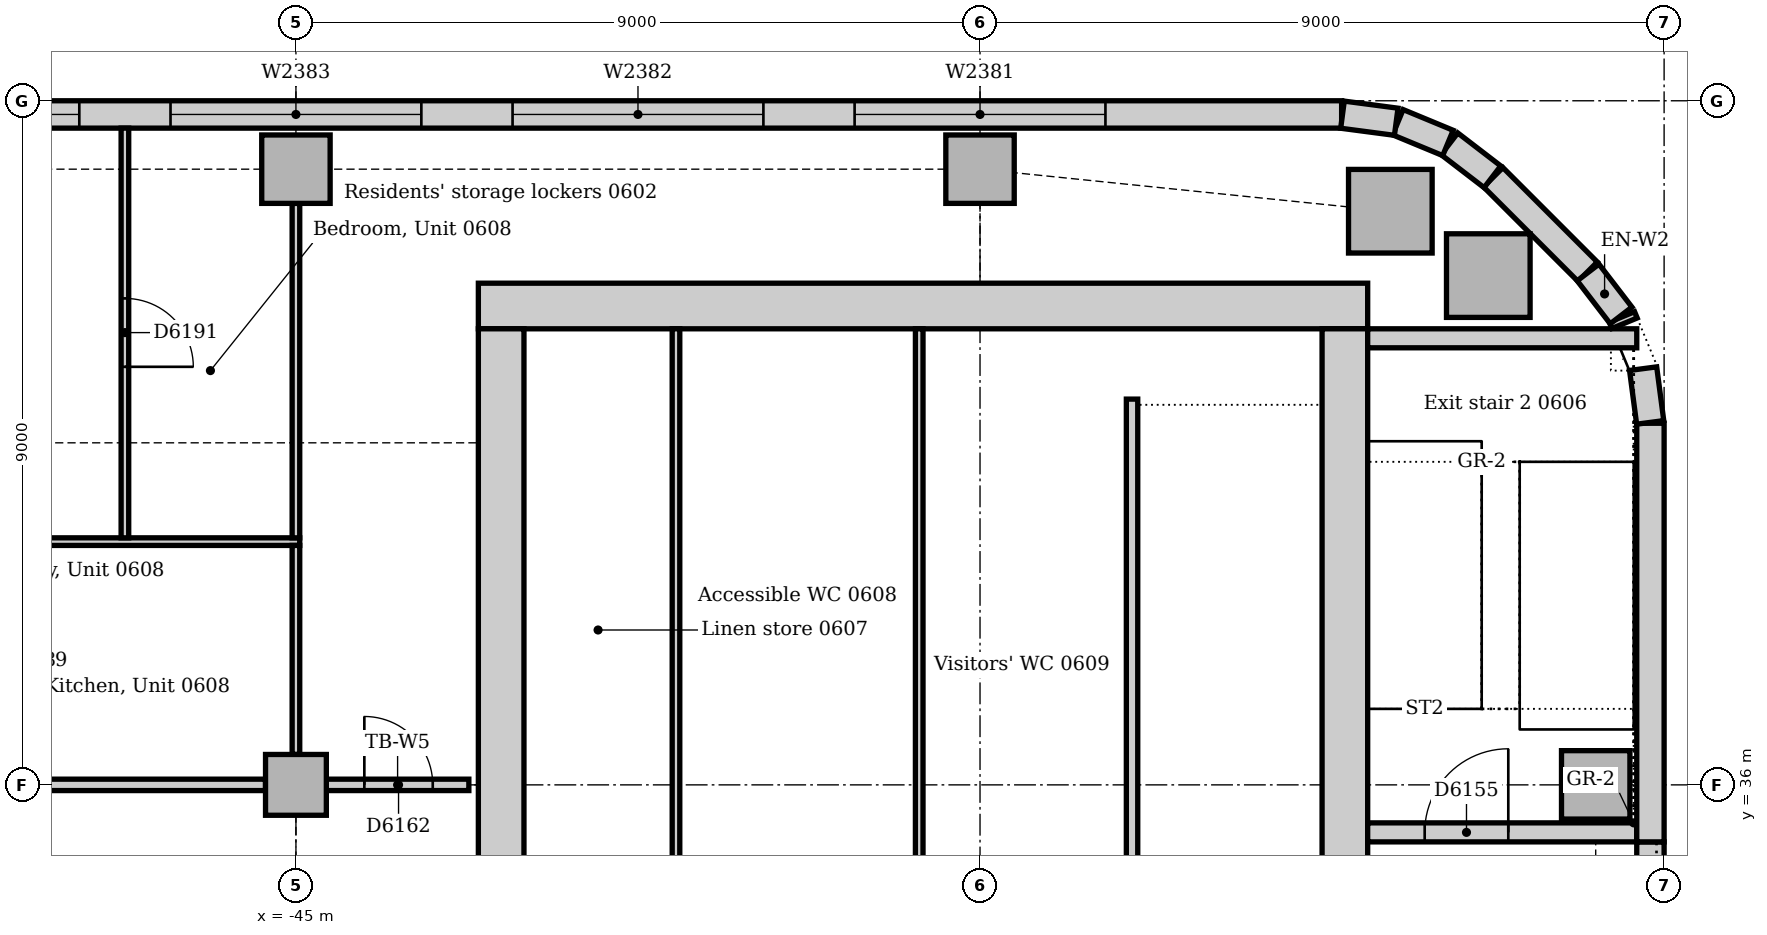
"""IFC4 building model, lengths in metres.
Left out: names, types, materials, properties, quantities, classifications, styles, units other than length and angle.
Written with IfcOpenShell. Run it as: python <this file> out.ifc"""

import sys

from ifc_helpers import new_model, si_unit, direction, frame, frame_2d, origin, origin_2d, place, context, subcontext, project, spatial, rectangle, extrude, element, fill, save


model = new_model("IFC4")
c1 = context("Model", 3, precision=1e-05, world=origin(), true_north=direction((0.0, 1.0)))
c2 = subcontext(c1, "Body", "Model", "MODEL_VIEW")
j1 = project(units=[si_unit("LENGTHUNIT", "METRE"), si_unit("PLANEANGLEUNIT", "RADIAN")], contexts=[c1])
p1 = place(None, origin())
s1 = spatial("IfcSite", under=j1, at=p1, CompositionType="ELEMENT")
p2 = place(p1, origin())
s2 = spatial("IfcBuilding", under=s1, at=p2, CompositionType="ELEMENT")
p3 = place(p2, frame((0.0, 0.0, 30.0)))
s3 = spatial("IfcBuildingStorey", under=s2, at=p3, CompositionType="ELEMENT", Elevation=30.0)
p4 = place(p3, frame((-30.9, 42.3, 0.0), z_axis=(0.0, 0.0, 1.0), x_axis=(-1.0, 0.0, 0.0)))
e1 = element("IfcWall", 1, at=p4, inside=s3, PredefinedType="SOLIDWALL", context=c2, shape_type="SweptSolid", body=[
    extrude(rectangle(XDim=11.7, YDim=0.6, at=frame_2d((5.85, 0.0))), origin(), (0.0, 0.0, 1.0), 4.0),
])
p5 = place(p3, frame((-31.2, 30.5, 0.0), z_axis=(0.0, 0.0, 1.0), x_axis=(0.0, 1.0, 0.0)))
e2 = element("IfcWall", 2, at=p5, inside=s3, PredefinedType="SOLIDWALL", context=c2, shape_type="SweptSolid", body=[
    extrude(rectangle(XDim=11.5, YDim=0.6, at=frame_2d((5.75, 0.0))), origin(), (0.0, 0.0, 1.0), 4.0),
])
p6 = place(p5, frame((0.85, 0.0, 0.0)))
e3 = element("IfcOpeningElement", 3, at=p6, cuts=e2, PredefinedType="OPENING", context=c2, shape_type="SweptSolid", body=[
    extrude(rectangle(XDim=1.8, YDim=2.1, at=frame_2d((0.9, 1.05))), frame((0.0, 0.31, 0.0), z_axis=(0.0, -1.0, 0.0), x_axis=(1.0, 0.0, 0.0)), (0.0, 0.0, 1.0), 0.62),
])
p7 = place(p3, frame((-42.3, 42.0, 0.0), z_axis=(0.0, 0.0, 1.0), x_axis=(0.0, -1.0, 0.0)))
e4 = element("IfcWall", 4, at=p7, inside=s3, PredefinedType="SOLIDWALL", context=c2, shape_type="SweptSolid", body=[
    extrude(rectangle(XDim=11.5, YDim=0.6, at=frame_2d((5.75, 0.0))), origin(), (0.0, 0.0, 1.0), 4.0),
])
p8 = place(p7, frame((8.85, 0.0, 0.0)))
e5 = element("IfcOpeningElement", 5, at=p8, cuts=e4, PredefinedType="OPENING", context=c2, shape_type="SweptSolid", body=[
    extrude(rectangle(XDim=1.8, YDim=2.1, at=frame_2d((0.9, 1.05))), frame((0.0, 0.31, 0.0), z_axis=(0.0, -1.0, 0.0), x_axis=(1.0, 0.0, 0.0)), (0.0, 0.0, 1.0), 0.62),
])
p9 = place(p3, frame((-30.9, 35.375, 0.0), z_axis=(0.0, 0.0, 1.0), x_axis=(1.0, 0.0, 0.0)))
e6 = element("IfcWall", 6, at=p9, inside=s3, PredefinedType="SOLIDWALL", context=c2, shape_type="SweptSolid", body=[
    extrude(rectangle(XDim=3.54, YDim=0.25, at=frame_2d((1.77, 0.0))), origin(), (0.0, 0.0, 1.0), 4.0),
])
p10 = place(p9, frame((0.75, 0.0, 0.0)))
e7 = element("IfcOpeningElement", 7, at=p10, cuts=e6, PredefinedType="OPENING", context=c2, shape_type="SweptSolid", body=[
    extrude(rectangle(XDim=1.1, YDim=2.1, at=frame_2d((0.55, 1.05))), frame((0.0, 0.135, 0.0), z_axis=(0.0, -1.0, 0.0), x_axis=(1.0, 0.0, 0.0)), (0.0, 0.0, 1.0), 0.27),
])
p11 = place(p3, frame((-27.36, 41.875, 0.0), z_axis=(0.0, 0.0, 1.0), x_axis=(-1.0, 0.0, 0.0)))
e8 = element("IfcWall", 8, at=p11, inside=s3, PredefinedType="SOLIDWALL", context=c2, shape_type="SweptSolid", body=[
    extrude(rectangle(XDim=3.54, YDim=0.25, at=frame_2d((1.77, 0.0))), origin(), (0.0, 0.0, 1.0), 4.0),
])
for number, where, z_axis, x_axis in (
    (9, (-29.313, 42.7, 0.0), (0.0, 0.0, 1.0), (1.0, 0.0, 0.0)),
    (10, (-30.602, 43.547, 0.0), (0.0, 0.0, 1.0), (1.0, 0.0, 0.0)),
):
    element("IfcColumn", number, at=place(p3, frame(where, z_axis=z_axis, x_axis=x_axis)), inside=s3, PredefinedType="COLUMN", context=c2, shape_type="SweptSolid", body=[
        extrude(rectangle(XDim=1.1, YDim=1.1, at=origin_2d()), origin(), (0.0, 0.0, 1.0), 3.85),
    ])
p12 = place(p3, frame((-27.9, 36.0, 0.0), z_axis=(0.0, 0.0, 1.0), x_axis=(1.0, 0.0, 0.0)))
e11 = element("IfcColumn", 11, at=p12, inside=s3, PredefinedType="COLUMN", context=c2, shape_type="SweptSolid", body=[
    extrude(rectangle(XDim=0.9, YDim=0.9, at=origin_2d()), origin(), (0.0, 0.0, 1.0), 4.0),
])
for number, where, z_axis, x_axis in (
    (12, (-45.0, 44.1, 0.0), (0.0, 0.0, 1.0), (1.0, 0.0, 0.0)),
    (13, (-36.0, 44.1, 0.0), (0.0, 0.0, 1.0), (1.0, 0.0, 0.0)),
):
    element("IfcColumn", number, at=place(p3, frame(where, z_axis=z_axis, x_axis=x_axis)), inside=s3, PredefinedType="COLUMN", context=c2, shape_type="SweptSolid", body=[
        extrude(rectangle(XDim=0.9, YDim=0.9, at=origin_2d()), origin(), (0.0, 0.0, 1.0), 3.85),
    ])
p13 = place(p3, frame((-45.0, 36.0, 0.0), z_axis=(0.0, 0.0, 1.0), x_axis=(1.0, 0.0, 0.0)))
e14 = element("IfcColumn", 14, at=p13, inside=s3, PredefinedType="COLUMN", context=c2, shape_type="SweptSolid", body=[
    extrude(rectangle(XDim=0.8, YDim=0.8, at=origin_2d()), origin(), (0.0, 0.0, 1.0), 3.85),
])
p14 = place(p3, frame((-27.18, 27.75, 0.0), z_axis=(0.0, 0.0, 1.0), x_axis=(0.0, 1.0, 0.0)))
e15 = element("IfcWall", 15, at=p14, inside=s3, PredefinedType="STANDARD", context=c2, shape_type="SweptSolid", body=[
    extrude(rectangle(XDim=7.5, YDim=0.36, at=frame_2d((3.75, 0.0))), origin(), (0.0, 0.0, 1.0), 3.85),
])
p15 = place(p14, frame((2.85, 0.0, 1.2)))
e16 = element("IfcOpeningElement", 16, at=p15, cuts=e15, PredefinedType="OPENING", context=c2, shape_type="SweptSolid", body=[
    extrude(rectangle(XDim=1.8, YDim=1.2, at=frame_2d((0.9, 0.6))), frame((0.0, 0.19, 0.0), z_axis=(0.0, -1.0, 0.0), x_axis=(1.0, 0.0, 0.0)), (0.0, 0.0, 1.0), 0.38),
])
p16 = place(p3, frame((-27.18, 35.25, 0.0), z_axis=(0.0, 0.0, 1.0), x_axis=(0.0, 1.0, 0.0)))
e17 = element("IfcWall", 17, at=p16, inside=s3, PredefinedType="STANDARD", context=c2, shape_type="SweptSolid", body=[
    extrude(rectangle(XDim=5.507, YDim=0.36, at=frame_2d((2.754, 0.0))), origin(), (0.0, 0.0, 1.0), 3.85),
])
p17 = place(p3, frame((-28.006, 42.751, 0.0), z_axis=(0.0, 0.0, 1.0), x_axis=(-0.707106781187, 0.707106781187, 0.0)))
e18 = element("IfcWall", 18, at=p17, inside=s3, PredefinedType="STANDARD", context=c2, shape_type="SweptSolid", body=[
    extrude(rectangle(XDim=1.757, YDim=0.36, at=frame_2d((0.879, 0.0))), origin(), (0.0, 0.0, 1.0), 3.85),
])
p18 = place(p3, frame((-31.243, 44.82, 0.0), z_axis=(0.0, 0.0, 1.0), x_axis=(-1.0, 0.0, 0.0)))
e19 = element("IfcWall", 19, at=p18, inside=s3, PredefinedType="STANDARD", context=c2, shape_type="SweptSolid", body=[
    extrude(rectangle(XDim=36.515, YDim=0.36, at=frame_2d((18.257, 0.0))), origin(), (0.0, 0.0, 1.0), 3.85),
])
p19 = place(p18, frame((3.107, 0.0, 0.9)))
e20 = element("IfcOpeningElement", 20, at=p19, cuts=e19, PredefinedType="OPENING", context=c2, shape_type="SweptSolid", body=[
    extrude(rectangle(XDim=3.3, YDim=1.6, at=frame_2d((1.65, 0.8))), frame((0.0, 0.19, 0.0), z_axis=(0.0, -1.0, 0.0), x_axis=(1.0, 0.0, 0.0)), (0.0, 0.0, 1.0), 0.38),
])
p20 = place(p18, frame((7.607, 0.0, 0.9)))
e21 = element("IfcOpeningElement", 21, at=p20, cuts=e19, PredefinedType="OPENING", context=c2, shape_type="SweptSolid", body=[
    extrude(rectangle(XDim=3.3, YDim=1.6, at=frame_2d((1.65, 0.8))), frame((0.0, 0.19, 0.0), z_axis=(0.0, -1.0, 0.0), x_axis=(1.0, 0.0, 0.0)), (0.0, 0.0, 1.0), 0.38),
])
p21 = place(p18, frame((12.107, 0.0, 0.9)))
e22 = element("IfcOpeningElement", 22, at=p21, cuts=e19, PredefinedType="OPENING", context=c2, shape_type="SweptSolid", body=[
    extrude(rectangle(XDim=3.3, YDim=1.6, at=frame_2d((1.65, 0.8))), frame((0.0, 0.19, 0.0), z_axis=(0.0, -1.0, 0.0), x_axis=(1.0, 0.0, 0.0)), (0.0, 0.0, 1.0), 0.38),
])
p22 = place(p18, frame((16.607, 0.0, 0.9)))
e23 = element("IfcOpeningElement", 23, at=p22, cuts=e19, PredefinedType="OPENING", context=c2, shape_type="SweptSolid", body=[
    extrude(rectangle(XDim=3.3, YDim=1.6, at=frame_2d((1.65, 0.8))), frame((0.0, 0.19, 0.0), z_axis=(0.0, -1.0, 0.0), x_axis=(1.0, 0.0, 0.0)), (0.0, 0.0, 1.0), 0.38),
])
p23 = place(p18, frame((21.107, 0.0, 0.9)))
e24 = element("IfcOpeningElement", 24, at=p23, cuts=e19, PredefinedType="OPENING", context=c2, shape_type="SweptSolid", body=[
    extrude(rectangle(XDim=3.3, YDim=1.6, at=frame_2d((1.65, 0.8))), frame((0.0, 0.19, 0.0), z_axis=(0.0, -1.0, 0.0), x_axis=(1.0, 0.0, 0.0)), (0.0, 0.0, 1.0), 0.38),
])
p24 = place(p18, frame((25.607, 0.0, 0.9)))
e25 = element("IfcOpeningElement", 25, at=p24, cuts=e19, PredefinedType="OPENING", context=c2, shape_type="SweptSolid", body=[
    extrude(rectangle(XDim=3.3, YDim=1.6, at=frame_2d((1.65, 0.8))), frame((0.0, 0.19, 0.0), z_axis=(0.0, -1.0, 0.0), x_axis=(1.0, 0.0, 0.0)), (0.0, 0.0, 1.0), 0.38),
])
p25 = place(p18, frame((30.107, 0.0, 0.9)))
e26 = element("IfcOpeningElement", 26, at=p25, cuts=e19, PredefinedType="OPENING", context=c2, shape_type="SweptSolid", body=[
    extrude(rectangle(XDim=3.3, YDim=1.6, at=frame_2d((1.65, 0.8))), frame((0.0, 0.19, 0.0), z_axis=(0.0, -1.0, 0.0), x_axis=(1.0, 0.0, 0.0)), (0.0, 0.0, 1.0), 0.38),
])
p26 = place(p3, frame((-27.183, 40.769, 0.0), z_axis=(0.0, 0.0, 1.0), x_axis=(-0.13055608231, 0.99144092581, 0.0)))
e27 = element("IfcWall", 27, at=p26, inside=s3, PredefinedType="STANDARD", context=c2, shape_type="SweptSolid", body=[
    extrude(rectangle(XDim=0.713, YDim=0.36, at=frame_2d((0.356, 0.0))), origin(), (0.0, 0.0, 1.0), 3.85),
])
p27 = place(p3, frame((-27.521, 42.074, 0.0), z_axis=(0.0, 0.0, 1.0), x_axis=(-0.382549378284, 0.923935048136, 0.0)))
e28 = element("IfcWall", 28, at=p27, inside=s3, PredefinedType="STANDARD", context=c2, shape_type="SweptSolid", body=[
    extrude(rectangle(XDim=0.089, YDim=0.36, at=frame_2d((0.045, 0.0))), origin(), (0.0, 0.0, 1.0), 3.85),
])
for number, where, z_axis, x_axis in (
    (29, (-27.566, 42.175, 0.0), (0.0, 0.0, 1.0), (-0.609, 0.793, 0.0)),
    (30, (-29.259, 44.0, 0.0), (0.0, 0.0, 1.0), (-0.793, 0.609, 0.0)),
):
    element("IfcWall", number, at=place(p3, frame(where, z_axis=z_axis, x_axis=x_axis)), inside=s3, PredefinedType="STANDARD", context=c2, shape_type="SweptSolid", body=[
        extrude(rectangle(XDim=0.713, YDim=0.36, at=frame_2d((0.357, 0.0))), origin(), (0.0, 0.0, 1.0), 3.85),
    ])
for number, where, z_axis, x_axis in (
    (31, (-29.844, 44.445, 0.0), (0.0, 0.0, 1.0), (-0.924, 0.383, 0.0)),
    (32, (-30.524, 44.724, 0.0), (0.0, 0.0, 1.0), (-0.991, 0.131, 0.0)),
):
    element("IfcWall", number, at=place(p3, frame(where, z_axis=z_axis, x_axis=x_axis)), inside=s3, PredefinedType="STANDARD", context=c2, shape_type="SweptSolid", body=[
        extrude(rectangle(XDim=0.713, YDim=0.36, at=frame_2d((0.356, 0.0))), origin(), (0.0, 0.0, 1.0), 3.85),
    ])
p28 = place(p3, frame((-34.0, 41.075, 0.0), z_axis=(0.0, 0.0, 1.0), x_axis=(0.0, -1.0, 0.0)))
e33 = element("IfcWall", 33, at=p28, inside=s3, PredefinedType="SOLIDWALL", context=c2, shape_type="SweptSolid", body=[
    extrude(rectangle(XDim=7.0, YDim=0.15, at=frame_2d((3.5, 0.0))), origin(), (0.0, 0.0, 1.0), 4.0),
])
for number, where, z_axis, x_axis in (
    (34, (-40.0, 34.075, 0.0), (0.0, 0.0, 1.0), (0.0, 1.0, 0.0)),
    (35, (-36.8, 34.075, 0.0), (0.0, 0.0, 1.0), (0.0, 1.0, 0.0)),
):
    element("IfcWall", number, at=place(p3, frame(where, z_axis=z_axis, x_axis=x_axis)), inside=s3, PredefinedType="PARTITIONING", context=c2, shape_type="SweptSolid", body=[
        extrude(rectangle(XDim=7.925, YDim=0.1, at=frame_2d((3.962, 0.0))), origin(), (0.0, 0.0, 1.0), 3.85),
    ])
p29 = place(p3, frame((-44.6, 36.0, 0.0), z_axis=(0.0, 0.0, 1.0), x_axis=(1.0, 0.0, 0.0)))
e36 = element("IfcWall", 36, at=p29, inside=s3, PredefinedType="PARTITIONING", context=c2, shape_type="SweptSolid", body=[
    extrude(rectangle(XDim=1.875, YDim=0.15, at=frame_2d((0.938, 0.0))), origin(), (0.0, 0.0, 1.0), 3.602),
])
p30 = place(p29, frame((0.5, 0.0, 0.0)))
e37 = element("IfcOpeningElement", 37, at=p30, cuts=e36, PredefinedType="OPENING", context=c2, shape_type="SweptSolid", body=[
    extrude(rectangle(XDim=0.9, YDim=2.1, at=frame_2d((0.45, 1.05))), frame((0.0, 0.085, 0.0), z_axis=(0.0, -1.0, 0.0), x_axis=(1.0, 0.0, 0.0)), (0.0, 0.0, 1.0), 0.17),
])
p31 = place(p3, frame((-53.6, 36.0, 0.0), z_axis=(0.0, 0.0, 1.0), x_axis=(1.0, 0.0, 0.0)))
e38 = element("IfcWall", 38, at=p31, inside=s3, PredefinedType="PARTITIONING", context=c2, shape_type="SweptSolid", body=[
    extrude(rectangle(XDim=8.2, YDim=0.15, at=frame_2d((4.1, 0.0))), origin(), (0.0, 0.0, 1.0), 3.15),
])
p32 = place(p31, frame((2.89, 0.0, 0.0)))
e39 = element("IfcOpeningElement", 39, at=p32, cuts=e38, PredefinedType="OPENING", context=c2, shape_type="SweptSolid", body=[
    extrude(rectangle(XDim=1.0, YDim=2.1, at=frame_2d((0.5, 1.05))), frame((0.0, 0.085, 0.0), z_axis=(0.0, -1.0, 0.0), x_axis=(1.0, 0.0, 0.0)), (0.0, 0.0, 1.0), 0.17),
])
p33 = place(p3, frame((-53.925, 39.2, 0.0), z_axis=(0.0, 0.0, 1.0), x_axis=(1.0, 0.0, 0.0)))
e40 = element("IfcWall", 40, at=p33, inside=s3, PredefinedType="PARTITIONING", context=c2, shape_type="SweptSolid", body=[
    extrude(rectangle(XDim=8.975, YDim=0.1, at=frame_2d((4.487, 0.0))), origin(), (0.0, 0.0, 1.0), 3.85),
])
p34 = place(p33, frame((3.265, 0.0, 0.0)))
e41 = element("IfcOpeningElement", 41, at=p34, cuts=e40, PredefinedType="OPENING", context=c2, shape_type="SweptSolid", body=[
    extrude(rectangle(XDim=0.9, YDim=2.1, at=frame_2d((0.45, 1.05))), frame((0.0, 0.06, 0.0), z_axis=(0.0, -1.0, 0.0), x_axis=(1.0, 0.0, 0.0)), (0.0, 0.0, 1.0), 0.12),
])
p35 = place(p3, frame((-45.0, 39.25, 0.0), z_axis=(0.0, 0.0, 1.0), x_axis=(0.0, 1.0, 0.0)))
e42 = element("IfcWall", 42, at=p35, inside=s3, PredefinedType="PARTITIONING", context=c2, shape_type="SweptSolid", body=[
    extrude(rectangle(XDim=4.4, YDim=0.1, at=frame_2d((2.2, 0.0))), origin(), (0.0, 0.0, 1.0), 3.158),
])
p36 = place(p3, frame((-45.0, 36.4, 0.0), z_axis=(0.0, 0.0, 1.0), x_axis=(0.0, 1.0, 0.0)))
e43 = element("IfcWall", 43, at=p36, inside=s3, PredefinedType="PARTITIONING", context=c2, shape_type="SweptSolid", body=[
    extrude(rectangle(XDim=2.75, YDim=0.1, at=frame_2d((1.375, 0.0))), origin(), (0.0, 0.0, 1.0), 3.158),
])
p37 = place(p3, frame((-47.25, 39.25, 0.0), z_axis=(0.0, 0.0, 1.0), x_axis=(0.0, 1.0, 0.0)))
e44 = element("IfcWall", 44, at=p37, inside=s3, PredefinedType="PARTITIONING", context=c2, shape_type="SweptSolid", body=[
    extrude(rectangle(XDim=5.39, YDim=0.1, at=frame_2d((2.695, 0.0))), origin(), (0.0, 0.0, 1.0), 3.85),
])
p38 = place(p37, frame((2.25, 0.0, 0.0)))
e45 = element("IfcOpeningElement", 45, at=p38, cuts=e44, PredefinedType="OPENING", context=c2, shape_type="SweptSolid", body=[
    extrude(rectangle(XDim=0.9, YDim=2.1, at=frame_2d((0.45, 1.05))), frame((0.0, 0.06, 0.0), z_axis=(0.0, -1.0, 0.0), x_axis=(1.0, 0.0, 0.0)), (0.0, 0.0, 1.0), 0.12),
])
p39 = place(p19, origin())
e46 = element("IfcWindow", 46, at=p39, inside=s3, PartitioningType="SINGLE_PANEL", PredefinedType="WINDOW", context=c2, shape_type="SweptSolid", body=[
    extrude(rectangle(XDim=3.3, YDim=1.6, at=frame_2d((1.65, 0.8))), frame((0.0, 0.13, 0.0), z_axis=(0.0, -1.0, 0.0), x_axis=(1.0, 0.0, 0.0)), (0.0, 0.0, 1.0), 0.06),
])
fill(e20, e46)
p40 = place(p20, origin())
e47 = element("IfcWindow", 47, at=p40, inside=s3, PartitioningType="SINGLE_PANEL", PredefinedType="WINDOW", context=c2, shape_type="SweptSolid", body=[
    extrude(rectangle(XDim=3.3, YDim=1.6, at=frame_2d((1.65, 0.8))), frame((0.0, 0.13, 0.0), z_axis=(0.0, -1.0, 0.0), x_axis=(1.0, 0.0, 0.0)), (0.0, 0.0, 1.0), 0.06),
])
fill(e21, e47)
p41 = place(p21, origin())
e48 = element("IfcWindow", 48, at=p41, inside=s3, PartitioningType="SINGLE_PANEL", PredefinedType="WINDOW", context=c2, shape_type="SweptSolid", body=[
    extrude(rectangle(XDim=3.3, YDim=1.6, at=frame_2d((1.65, 0.8))), frame((0.0, 0.13, 0.0), z_axis=(0.0, -1.0, 0.0), x_axis=(1.0, 0.0, 0.0)), (0.0, 0.0, 1.0), 0.06),
])
fill(e22, e48)
p42 = place(p22, origin())
e49 = element("IfcWindow", 49, at=p42, inside=s3, PartitioningType="SINGLE_PANEL", PredefinedType="WINDOW", context=c2, shape_type="SweptSolid", body=[
    extrude(rectangle(XDim=3.3, YDim=1.6, at=frame_2d((1.65, 0.8))), frame((0.0, 0.13, 0.0), z_axis=(0.0, -1.0, 0.0), x_axis=(1.0, 0.0, 0.0)), (0.0, 0.0, 1.0), 0.06),
])
fill(e23, e49)
p43 = place(p10, origin())
e50 = element("IfcDoor", 50, at=p43, inside=s3, OperationType="SINGLE_SWING_RIGHT", PredefinedType="DOOR", context=c2, shape_type="SweptSolid", body=[
    extrude(rectangle(XDim=1.1, YDim=2.1, at=frame_2d((0.55, 1.05))), frame((0.0, 0.025, 0.0), z_axis=(0.0, -1.0, 0.0), x_axis=(1.0, 0.0, 0.0)), (0.0, 0.0, 1.0), 0.05),
])
fill(e7, e50)
p44 = place(p30, origin())
e51 = element("IfcDoor", 51, at=p44, inside=s3, OperationType="SINGLE_SWING_LEFT", PredefinedType="DOOR", context=c2, shape_type="SweptSolid", body=[
    extrude(rectangle(XDim=0.9, YDim=2.1, at=frame_2d((0.45, 1.05))), frame((0.0, 0.025, 0.0), z_axis=(0.0, -1.0, 0.0), x_axis=(1.0, 0.0, 0.0)), (0.0, 0.0, 1.0), 0.05),
])
fill(e37, e51)
p45 = place(p38, frame((0.9, 0.0, 0.0), z_axis=(0.0, 0.0, 1.0), x_axis=(-1.0, 0.0, 0.0)))
e52 = element("IfcDoor", 52, at=p45, inside=s3, OperationType="SINGLE_SWING_RIGHT", PredefinedType="DOOR", context=c2, shape_type="SweptSolid", body=[
    extrude(rectangle(XDim=0.9, YDim=2.1, at=frame_2d((0.45, 1.05))), frame((0.0, 0.025, 0.0), z_axis=(0.0, -1.0, 0.0), x_axis=(1.0, 0.0, 0.0)), (0.0, 0.0, 1.0), 0.05),
])
fill(e45, e52)
save(model, sys.argv[1])
